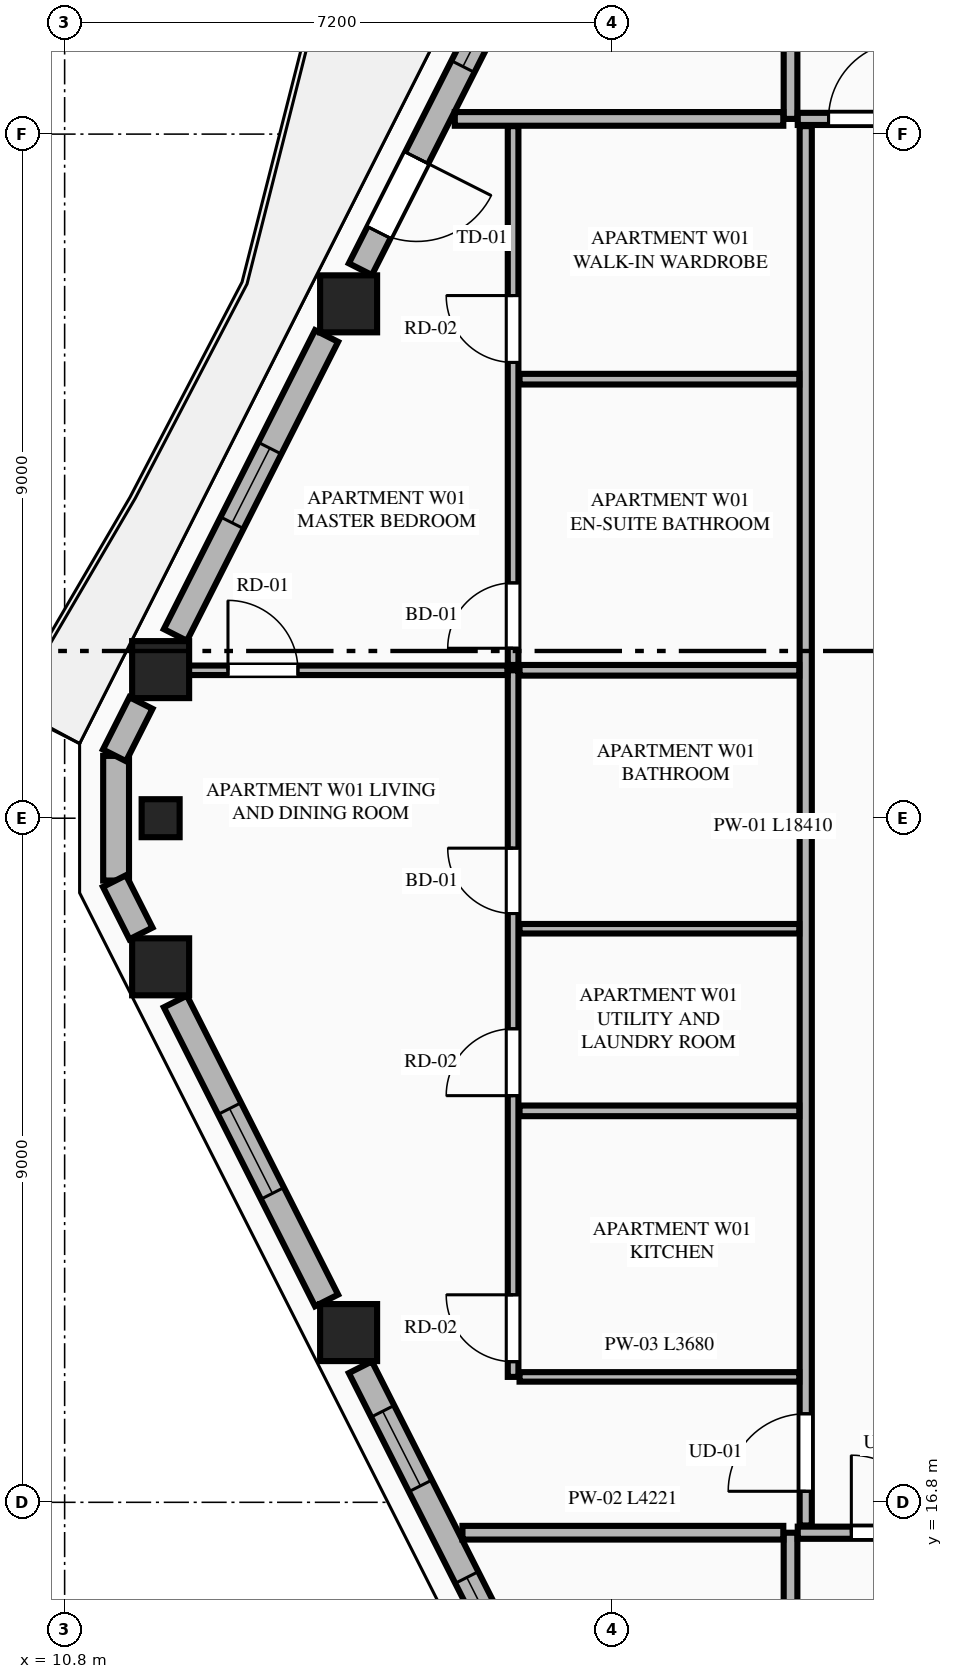
"""IFC4 building model, lengths in metres.
Left out: names, types, materials, properties, quantities, classifications, styles, units other than length and angle.
Written with IfcOpenShell. Run it as: python <this file> out.ifc"""

import sys

from ifc_helpers import new_model, si_unit, direction, frame, frame_2d, origin, origin_2d, place, context, subcontext, project, spatial, rectangle, extrude, element, fill, save


model = new_model("IFC4")
c1 = context("Model", 3, precision=1e-05, world=origin(), true_north=direction((0.0, 1.0)))
c2 = subcontext(c1, "Body", "Model", "MODEL_VIEW")
j1 = project(units=[si_unit("LENGTHUNIT", "METRE"), si_unit("PLANEANGLEUNIT", "RADIAN")], contexts=[c1])
p1 = place(None, origin())
s1 = spatial("IfcSite", under=j1, at=p1, CompositionType="ELEMENT")
p2 = place(p1, origin())
s2 = spatial("IfcBuilding", under=s1, at=p2, CompositionType="ELEMENT")
p3 = place(p2, frame((0.0, 0.0, 234.3)))
s3 = spatial("IfcBuildingStorey", under=s2, at=p3, CompositionType="ELEMENT", Elevation=234.3)
for number, where, z_axis, x_axis in (
    (1, (14.536, 32.567, 0.0), (0.0, 0.0, 1.0), (1.0, 0.0, 0.0)),
    (2, (12.063, 27.755, 0.0), (0.0, 0.0, 1.0), (1.0, 0.0, 0.0)),
    (3, (12.063, 23.845, 0.0), (0.0, 0.0, 1.0), (1.0, 0.0, 0.0)),
    (4, (14.536, 19.033, 0.0), (0.0, 0.0, 1.0), (1.0, 0.0, 0.0)),
):
    element("IfcColumn", number, at=place(p3, frame(where, z_axis=z_axis, x_axis=x_axis)), inside=s3, PredefinedType="COLUMN", context=c2, shape_type="SweptSolid", body=[
        extrude(rectangle(XDim=0.75, YDim=0.75, at=origin_2d()), origin(), (0.0, 0.0, 1.0), 3.65),
    ])
p4 = place(p3, frame((12.063, 25.8, 0.0), z_axis=(0.0, 0.0, 1.0), x_axis=(0.0, -1.0, 0.0)))
e5 = element("IfcColumn", 5, at=p4, inside=s3, PredefinedType="PILASTER", context=c2, shape_type="SweptSolid", body=[
    extrude(rectangle(XDim=0.5, YDim=0.35, at=origin_2d()), origin(), (0.0, 0.0, 1.0), 3.65),
])
p5 = place(p3, frame((11.477, 26.62, 0.0), z_axis=(0.0, 0.0, 1.0), x_axis=(0.0, -1.0, 0.0)))
e6 = element("IfcWall", 6, at=p5, inside=s3, PredefinedType="STANDARD", context=c2, shape_type="SweptSolid", body=[
    extrude(rectangle(XDim=1.64, YDim=0.34, at=frame_2d((0.82, 0.0))), origin(), (0.0, 0.0, 1.0), 3.45),
])
p6 = place(p3, frame((16.768, 37.127, 0.0), z_axis=(0.0, 0.0, 1.0), x_axis=(-0.451581819983, -0.892229712496, 0.0)))
e7 = element("IfcWall", 7, at=p6, inside=s3, PredefinedType="STANDARD", context=c2, shape_type="SweptSolid", body=[
    extrude(rectangle(XDim=4.6, YDim=0.34, at=frame_2d((2.3, 0.0))), origin(), (0.0, 0.0, 1.0), 2.983),
])
p7 = place(p6, frame((2.958, 0.0, 0.0)))
e8 = element("IfcOpeningElement", 8, at=p7, cuts=e7, PredefinedType="OPENING", context=c2, shape_type="SweptSolid", body=[
    extrude(rectangle(XDim=1.1, YDim=2.25, at=frame_2d((0.55, 1.125))), frame((0.0, 0.18, 0.0), z_axis=(0.0, -1.0, 0.0), x_axis=(1.0, 0.0, 0.0)), (0.0, 0.0, 1.0), 0.36),
])
p8 = place(p6, frame((0.512, 0.0, 0.75)))
e9 = element("IfcOpeningElement", 9, at=p8, cuts=e7, PredefinedType="OPENING", context=c2, shape_type="SweptSolid", body=[
    extrude(rectangle(XDim=1.1, YDim=2.0, at=frame_2d((0.55, 1.0))), frame((0.0, 0.18, 0.0), z_axis=(0.0, -1.0, 0.0), x_axis=(1.0, 0.0, 0.0)), (0.0, 0.0, 1.0), 0.36),
])
p9 = place(p3, frame((14.246, 32.144, 0.0), z_axis=(0.0, 0.0, 1.0), x_axis=(-0.451285866323, -0.892379441077, 0.0)))
e10 = element("IfcWall", 10, at=p9, inside=s3, PredefinedType="STANDARD", context=c2, shape_type="SweptSolid", body=[
    extrude(rectangle(XDim=4.407, YDim=0.34, at=frame_2d((2.204, 0.0))), origin(), (0.0, 0.0, 1.0), 2.983),
])
p10 = place(p9, frame((1.654, 0.0, 0.75)))
e11 = element("IfcOpeningElement", 11, at=p10, cuts=e10, PredefinedType="OPENING", context=c2, shape_type="SweptSolid", body=[
    extrude(rectangle(XDim=1.1, YDim=2.0, at=frame_2d((0.55, 1.0))), frame((0.0, 0.18, 0.0), z_axis=(0.0, -1.0, 0.0), x_axis=(1.0, 0.0, 0.0)), (0.0, 0.0, 1.0), 0.36),
])
for number, where, z_axis, x_axis in (
    (12, (11.804, 27.316, 0.0), (0.0, 0.0, 1.0), (-0.451, -0.893, 0.0)),
    (13, (11.456, 24.973, 0.0), (0.0, 0.0, 1.0), (0.451, -0.893, 0.0)),
):
    element("IfcWall", number, at=place(p3, frame(where, z_axis=z_axis, x_axis=x_axis)), inside=s3, PredefinedType="STANDARD", context=c2, shape_type="SweptSolid", body=[
        extrude(rectangle(XDim=0.772, YDim=0.34, at=frame_2d((0.386, 0.0))), origin(), (0.0, 0.0, 1.0), 3.45),
    ])
p11 = place(p3, frame((12.257, 23.389, 0.0), z_axis=(0.0, 0.0, 1.0), x_axis=(0.45130817501, -0.892368158984, 0.0)))
e14 = element("IfcWall", 14, at=p11, inside=s3, PredefinedType="STANDARD", context=c2, shape_type="SweptSolid", body=[
    extrude(rectangle(XDim=4.407, YDim=0.34, at=frame_2d((2.204, 0.0))), origin(), (0.0, 0.0, 1.0), 2.983),
])
p12 = place(p11, frame((1.579, 0.0, 0.75)))
e15 = element("IfcOpeningElement", 15, at=p12, cuts=e14, PredefinedType="OPENING", context=c2, shape_type="SweptSolid", body=[
    extrude(rectangle(XDim=1.25, YDim=1.95, at=frame_2d((0.625, 0.975))), frame((0.0, 0.18, 0.0), z_axis=(0.0, -1.0, 0.0), x_axis=(1.0, 0.0, 0.0)), (0.0, 0.0, 1.0), 0.36),
])
p13 = place(p3, frame((14.691, 18.577, 0.0), z_axis=(0.0, 0.0, 1.0), x_axis=(0.451581819983, -0.892229712496, 0.0)))
e16 = element("IfcWall", 16, at=p13, inside=s3, PredefinedType="STANDARD", context=c2, shape_type="SweptSolid", body=[
    extrude(rectangle(XDim=4.6, YDim=0.34, at=frame_2d((2.3, 0.0))), origin(), (0.0, 0.0, 1.0), 2.983),
])
p14 = place(p13, frame((0.649, 0.0, 0.75)))
e17 = element("IfcOpeningElement", 17, at=p14, cuts=e16, PredefinedType="OPENING", context=c2, shape_type="SweptSolid", body=[
    extrude(rectangle(XDim=1.1, YDim=2.0, at=frame_2d((0.55, 1.0))), frame((0.0, 0.18, 0.0), z_axis=(0.0, -1.0, 0.0), x_axis=(1.0, 0.0, 0.0)), (0.0, 0.0, 1.0), 0.36),
])
p15 = place(p13, frame((3.1, 0.0, 0.75)))
e18 = element("IfcOpeningElement", 18, at=p15, cuts=e16, PredefinedType="OPENING", context=c2, shape_type="SweptSolid", body=[
    extrude(rectangle(XDim=1.1, YDim=2.0, at=frame_2d((0.55, 1.0))), frame((0.0, 0.18, 0.0), z_axis=(0.0, -1.0, 0.0), x_axis=(1.0, 0.0, 0.0)), (0.0, 0.0, 1.0), 0.36),
])
p16 = place(p3, frame((20.35, 8.119, 0.0), z_axis=(0.0, 0.0, 1.0), x_axis=(0.0, 1.0, 0.0)))
e19 = element("IfcWall", 19, at=p16, inside=s3, PredefinedType="PARTITIONING", context=c2, shape_type="SweptSolid", body=[
    extrude(rectangle(XDim=8.281, YDim=0.18, at=frame_2d((4.141, 0.0))), origin(), (0.0, 0.0, 1.0), 3.45),
])
p17 = place(p3, frame((20.445, 16.4, 0.0), z_axis=(0.0, 0.0, 1.0), x_axis=(1.0, 0.0, 0.0)))
e20 = element("IfcWall", 20, at=p17, inside=s3, PredefinedType="PARTITIONING", context=c2, shape_type="SweptSolid", body=[
    extrude(rectangle(XDim=8.606, YDim=0.16, at=frame_2d((4.303, 0.0))), origin(), (0.0, 0.0, 1.0), 3.45),
])
p18 = place(p17, frame((0.705, 0.0, 0.0)))
e21 = element("IfcOpeningElement", 21, at=p18, cuts=e20, PredefinedType="OPENING", context=c2, shape_type="SweptSolid", body=[
    extrude(rectangle(XDim=1.02, YDim=2.25, at=frame_2d((0.51, 1.125))), frame((0.0, 0.09, 0.0), z_axis=(0.0, -1.0, 0.0), x_axis=(1.0, 0.0, 0.0)), (0.0, 0.0, 1.0), 0.18),
])
p19 = place(p3, frame((20.35, 35.0, 0.0), z_axis=(0.0, 0.0, 1.0), x_axis=(0.0, 1.0, 0.0)))
e22 = element("IfcWall", 22, at=p19, inside=s3, PredefinedType="PARTITIONING", context=c2, shape_type="SweptSolid", body=[
    extrude(rectangle(XDim=8.481, YDim=0.18, at=frame_2d((4.24, 0.0))), origin(), (0.0, 0.0, 1.0), 3.45),
])
p20 = place(p3, frame((20.445, 35.0, 0.0), z_axis=(0.0, 0.0, 1.0), x_axis=(1.0, 0.0, 0.0)))
e23 = element("IfcWall", 23, at=p20, inside=s3, PredefinedType="PARTITIONING", context=c2, shape_type="SweptSolid", body=[
    extrude(rectangle(XDim=8.606, YDim=0.16, at=frame_2d((4.303, 0.0))), origin(), (0.0, 0.0, 1.0), 3.45),
])
p21 = place(p20, frame((0.405, 0.0, 0.0)))
e24 = element("IfcOpeningElement", 24, at=p21, cuts=e23, PredefinedType="OPENING", context=c2, shape_type="SweptSolid", body=[
    extrude(rectangle(XDim=1.02, YDim=2.25, at=frame_2d((0.51, 1.125))), frame((0.0, 0.09, 0.0), z_axis=(0.0, -1.0, 0.0), x_axis=(1.0, 0.0, 0.0)), (0.0, 0.0, 1.0), 0.18),
])
p22 = place(p3, frame((16.034, 16.4, 0.0), z_axis=(0.0, 0.0, 1.0), x_axis=(1.0, 0.0, 0.0)))
e25 = element("IfcWall", 25, at=p22, inside=s3, PredefinedType="PARTITIONING", context=c2, shape_type="SweptSolid", body=[
    extrude(rectangle(XDim=4.221, YDim=0.18, at=frame_2d((2.11, 0.0))), origin(), (0.0, 0.0, 1.0), 3.45),
])
p23 = place(p3, frame((15.933, 35.0, 0.0), z_axis=(0.0, 0.0, 1.0), x_axis=(1.0, 0.0, 0.0)))
e26 = element("IfcWall", 26, at=p23, inside=s3, PredefinedType="PARTITIONING", context=c2, shape_type="SweptSolid", body=[
    extrude(rectangle(XDim=4.322, YDim=0.18, at=frame_2d((2.161, 0.0))), origin(), (0.0, 0.0, 1.0), 3.45),
])
p24 = place(p3, frame((20.55, 16.495, 0.0), z_axis=(0.0, 0.0, 1.0), x_axis=(0.0, 1.0, 0.0)))
e27 = element("IfcWall", 27, at=p24, inside=s3, PredefinedType="PARTITIONING", context=c2, shape_type="SweptSolid", body=[
    extrude(rectangle(XDim=18.41, YDim=0.16, at=frame_2d((9.205, 0.0))), origin(), (0.0, 0.0, 1.0), 3.137),
])
p25 = place(p24, frame((0.45, 0.0, 0.0)))
e28 = element("IfcOpeningElement", 28, at=p25, cuts=e27, PredefinedType="OPENING", context=c2, shape_type="SweptSolid", body=[
    extrude(rectangle(XDim=1.02, YDim=2.25, at=frame_2d((0.51, 1.125))), frame((0.0, 0.09, 0.0), z_axis=(0.0, -1.0, 0.0), x_axis=(1.0, 0.0, 0.0)), (0.0, 0.0, 1.0), 0.18),
])
p26 = place(p3, frame((16.785, 18.45, 0.0), z_axis=(0.0, 0.0, 1.0), x_axis=(1.0, 0.0, 0.0)))
e29 = element("IfcWall", 29, at=p26, inside=s3, PredefinedType="PARTITIONING", context=c2, shape_type="SweptSolid", body=[
    extrude(rectangle(XDim=3.68, YDim=0.125, at=frame_2d((1.84, 0.0))), origin(), (0.0, 0.0, 1.0), 3.45),
])
p27 = place(p3, frame((16.7, 18.45, 0.0), z_axis=(0.0, 0.0, 1.0), x_axis=(0.0, 1.0, 0.0)))
e30 = element("IfcWall", 30, at=p27, inside=s3, PredefinedType="PLUMBINGWALL", context=c2, shape_type="SweptSolid", body=[
    extrude(rectangle(XDim=9.296, YDim=0.14, at=frame_2d((4.648, 0.0))), origin(), (0.0, 0.0, 1.0), 3.45),
])
p28 = place(p27, frame((0.2, 0.0, 0.0)))
e31 = element("IfcOpeningElement", 31, at=p28, cuts=e30, PredefinedType="OPENING", context=c2, shape_type="SweptSolid", body=[
    extrude(rectangle(XDim=0.88, YDim=2.15, at=frame_2d((0.44, 1.075))), frame((0.0, 0.08, 0.0), z_axis=(0.0, -1.0, 0.0), x_axis=(1.0, 0.0, 0.0)), (0.0, 0.0, 1.0), 0.16),
])
p29 = place(p27, frame((3.7, 0.0, 0.0)))
e32 = element("IfcOpeningElement", 32, at=p29, cuts=e30, PredefinedType="OPENING", context=c2, shape_type="SweptSolid", body=[
    extrude(rectangle(XDim=0.88, YDim=2.15, at=frame_2d((0.44, 1.075))), frame((0.0, 0.08, 0.0), z_axis=(0.0, -1.0, 0.0), x_axis=(1.0, 0.0, 0.0)), (0.0, 0.0, 1.0), 0.16),
])
p30 = place(p27, frame((6.096, 0.0, 0.0)))
e33 = element("IfcOpeningElement", 33, at=p30, cuts=e30, PredefinedType="OPENING", context=c2, shape_type="SweptSolid", body=[
    extrude(rectangle(XDim=0.86, YDim=2.1, at=frame_2d((0.43, 1.05))), frame((0.0, 0.08, 0.0), z_axis=(0.0, -1.0, 0.0), x_axis=(1.0, 0.0, 0.0)), (0.0, 0.0, 1.0), 0.16),
])
p31 = place(p3, frame((16.7, 27.816, 0.0), z_axis=(0.0, 0.0, 1.0), x_axis=(0.0, 1.0, 0.0)))
e34 = element("IfcWall", 34, at=p31, inside=s3, PredefinedType="PLUMBINGWALL", context=c2, shape_type="SweptSolid", body=[
    extrude(rectangle(XDim=7.089, YDim=0.14, at=frame_2d((3.544, 0.0))), origin(), (0.0, 0.0, 1.0), 3.45),
])
p32 = place(p31, frame((0.22, 0.0, 0.0)))
e35 = element("IfcOpeningElement", 35, at=p32, cuts=e34, PredefinedType="OPENING", context=c2, shape_type="SweptSolid", body=[
    extrude(rectangle(XDim=0.86, YDim=2.1, at=frame_2d((0.43, 1.05))), frame((0.0, 0.08, 0.0), z_axis=(0.0, -1.0, 0.0), x_axis=(1.0, 0.0, 0.0)), (0.0, 0.0, 1.0), 0.16),
])
p33 = place(p31, frame((3.98, 0.0, 0.0)))
e36 = element("IfcOpeningElement", 36, at=p33, cuts=e34, PredefinedType="OPENING", context=c2, shape_type="SweptSolid", body=[
    extrude(rectangle(XDim=0.88, YDim=2.15, at=frame_2d((0.44, 1.075))), frame((0.0, 0.08, 0.0), z_axis=(0.0, -1.0, 0.0), x_axis=(1.0, 0.0, 0.0)), (0.0, 0.0, 1.0), 0.16),
])
p34 = place(p3, frame((16.785, 27.746, 0.0), z_axis=(0.0, 0.0, 1.0), x_axis=(1.0, 0.0, 0.0)))
e37 = element("IfcWall", 37, at=p34, inside=s3, PredefinedType="PLUMBINGWALL", context=c2, shape_type="SweptSolid", body=[
    extrude(rectangle(XDim=3.68, YDim=0.14, at=frame_2d((1.84, 0.0))), origin(), (0.0, 0.0, 1.0), 2.907),
])
p35 = place(p3, frame((12.249, 27.746, 0.0), z_axis=(0.0, 0.0, 1.0), x_axis=(1.0, 0.0, 0.0)))
e38 = element("IfcWall", 38, at=p35, inside=s3, PredefinedType="PARTITIONING", context=c2, shape_type="SweptSolid", body=[
    extrude(rectangle(XDim=4.376, YDim=0.125, at=frame_2d((2.188, 0.0))), origin(), (0.0, 0.0, 1.0), 2.907),
])
p36 = place(p35, frame((0.7, 0.0, 0.0)))
e39 = element("IfcOpeningElement", 39, at=p36, cuts=e38, PredefinedType="OPENING", context=c2, shape_type="SweptSolid", body=[
    extrude(rectangle(XDim=0.92, YDim=2.15, at=frame_2d((0.46, 1.075))), frame((0.0, 0.073, 0.0), z_axis=(0.0, -1.0, 0.0), x_axis=(1.0, 0.0, 0.0)), (0.0, 0.0, 1.0), 0.145),
])
p37 = place(p3, frame((16.785, 21.95, 0.0), z_axis=(0.0, 0.0, 1.0), x_axis=(1.0, 0.0, 0.0)))
e40 = element("IfcWall", 40, at=p37, inside=s3, PredefinedType="PLUMBINGWALL", context=c2, shape_type="SweptSolid", body=[
    extrude(rectangle(XDim=3.68, YDim=0.14, at=frame_2d((1.84, 0.0))), origin(), (0.0, 0.0, 1.0), 3.45),
])
p38 = place(p3, frame((16.785, 24.346, 0.0), z_axis=(0.0, 0.0, 1.0), x_axis=(1.0, 0.0, 0.0)))
e41 = element("IfcWall", 41, at=p38, inside=s3, PredefinedType="PARTITIONING", context=c2, shape_type="SweptSolid", body=[
    extrude(rectangle(XDim=3.68, YDim=0.125, at=frame_2d((1.84, 0.0))), origin(), (0.0, 0.0, 1.0), 3.45),
])
p39 = place(p3, frame((16.785, 31.576, 0.0), z_axis=(0.0, 0.0, 1.0), x_axis=(1.0, 0.0, 0.0)))
e42 = element("IfcWall", 42, at=p39, inside=s3, PredefinedType="PLUMBINGWALL", context=c2, shape_type="SweptSolid", body=[
    extrude(rectangle(XDim=3.68, YDim=0.14, at=frame_2d((1.84, 0.0))), origin(), (0.0, 0.0, 1.0), 3.45),
])
p40 = place(p7, origin())
e43 = element("IfcDoor", 43, at=p40, inside=s3, OperationType="SINGLE_SWING_LEFT", PredefinedType="DOOR", context=c2, shape_type="SweptSolid", body=[
    extrude(rectangle(XDim=1.1, YDim=2.25, at=frame_2d((0.55, 1.125))), frame((0.0, 0.025, 0.0), z_axis=(0.0, -1.0, 0.0), x_axis=(1.0, 0.0, 0.0)), (0.0, 0.0, 1.0), 0.05),
])
fill(e8, e43)
p41 = place(p10, origin())
e44 = element("IfcWindow", 44, at=p41, inside=s3, PartitioningType="SINGLE_PANEL", PredefinedType="WINDOW", context=c2, shape_type="SweptSolid", body=[
    extrude(rectangle(XDim=1.1, YDim=2.0, at=frame_2d((0.55, 1.0))), frame((0.0, 0.03, 0.0), z_axis=(0.0, -1.0, 0.0), x_axis=(1.0, 0.0, 0.0)), (0.0, 0.0, 1.0), 0.06),
])
fill(e11, e44)
p42 = place(p12, origin())
e45 = element("IfcWindow", 45, at=p42, inside=s3, PartitioningType="SINGLE_PANEL", PredefinedType="WINDOW", context=c2, shape_type="SweptSolid", body=[
    extrude(rectangle(XDim=1.25, YDim=1.95, at=frame_2d((0.625, 0.975))), frame((0.0, 0.03, 0.0), z_axis=(0.0, -1.0, 0.0), x_axis=(1.0, 0.0, 0.0)), (0.0, 0.0, 1.0), 0.06),
])
fill(e15, e45)
p43 = place(p14, origin())
e46 = element("IfcWindow", 46, at=p43, inside=s3, PartitioningType="SINGLE_PANEL", PredefinedType="WINDOW", context=c2, shape_type="SweptSolid", body=[
    extrude(rectangle(XDim=1.1, YDim=2.0, at=frame_2d((0.55, 1.0))), frame((0.0, 0.03, 0.0), z_axis=(0.0, -1.0, 0.0), x_axis=(1.0, 0.0, 0.0)), (0.0, 0.0, 1.0), 0.06),
])
fill(e17, e46)
p44 = place(p18, origin())
e47 = element("IfcDoor", 47, at=p44, inside=s3, OperationType="SINGLE_SWING_LEFT", PredefinedType="DOOR", context=c2, shape_type="SweptSolid", body=[
    extrude(rectangle(XDim=1.02, YDim=2.25, at=frame_2d((0.51, 1.125))), frame((0.0, 0.025, 0.0), z_axis=(0.0, -1.0, 0.0), x_axis=(1.0, 0.0, 0.0)), (0.0, 0.0, 1.0), 0.05),
])
fill(e21, e47)
p45 = place(p21, origin())
e48 = element("IfcDoor", 48, at=p45, inside=s3, OperationType="SINGLE_SWING_RIGHT", PredefinedType="DOOR", context=c2, shape_type="SweptSolid", body=[
    extrude(rectangle(XDim=1.02, YDim=2.25, at=frame_2d((0.51, 1.125))), frame((0.0, 0.025, 0.0), z_axis=(0.0, -1.0, 0.0), x_axis=(1.0, 0.0, 0.0)), (0.0, 0.0, 1.0), 0.05),
])
fill(e24, e48)
p46 = place(p28, origin())
e49 = element("IfcDoor", 49, at=p46, inside=s3, OperationType="SINGLE_SWING_RIGHT", PredefinedType="DOOR", context=c2, shape_type="SweptSolid", body=[
    extrude(rectangle(XDim=0.88, YDim=2.15, at=frame_2d((0.44, 1.075))), frame((0.0, 0.025, 0.0), z_axis=(0.0, -1.0, 0.0), x_axis=(1.0, 0.0, 0.0)), (0.0, 0.0, 1.0), 0.05),
])
fill(e31, e49)
p47 = place(p29, origin())
e50 = element("IfcDoor", 50, at=p47, inside=s3, OperationType="SINGLE_SWING_LEFT", PredefinedType="DOOR", context=c2, shape_type="SweptSolid", body=[
    extrude(rectangle(XDim=0.88, YDim=2.15, at=frame_2d((0.44, 1.075))), frame((0.0, 0.025, 0.0), z_axis=(0.0, -1.0, 0.0), x_axis=(1.0, 0.0, 0.0)), (0.0, 0.0, 1.0), 0.05),
])
fill(e32, e50)
p48 = place(p30, origin())
e51 = element("IfcDoor", 51, at=p48, inside=s3, OperationType="SINGLE_SWING_RIGHT", PredefinedType="DOOR", context=c2, shape_type="SweptSolid", body=[
    extrude(rectangle(XDim=0.86, YDim=2.1, at=frame_2d((0.43, 1.05))), frame((0.0, 0.025, 0.0), z_axis=(0.0, -1.0, 0.0), x_axis=(1.0, 0.0, 0.0)), (0.0, 0.0, 1.0), 0.05),
])
fill(e33, e51)
p49 = place(p32, origin())
e52 = element("IfcDoor", 52, at=p49, inside=s3, OperationType="SINGLE_SWING_LEFT", PredefinedType="DOOR", context=c2, shape_type="SweptSolid", body=[
    extrude(rectangle(XDim=0.86, YDim=2.1, at=frame_2d((0.43, 1.05))), frame((0.0, 0.025, 0.0), z_axis=(0.0, -1.0, 0.0), x_axis=(1.0, 0.0, 0.0)), (0.0, 0.0, 1.0), 0.05),
])
fill(e35, e52)
p50 = place(p33, origin())
e53 = element("IfcDoor", 53, at=p50, inside=s3, OperationType="SINGLE_SWING_RIGHT", PredefinedType="DOOR", context=c2, shape_type="SweptSolid", body=[
    extrude(rectangle(XDim=0.88, YDim=2.15, at=frame_2d((0.44, 1.075))), frame((0.0, 0.025, 0.0), z_axis=(0.0, -1.0, 0.0), x_axis=(1.0, 0.0, 0.0)), (0.0, 0.0, 1.0), 0.05),
])
fill(e36, e53)
p51 = place(p25, origin())
e54 = element("IfcDoor", 54, at=p51, inside=s3, OperationType="SINGLE_SWING_LEFT", PredefinedType="DOOR", context=c2, shape_type="SweptSolid", body=[
    extrude(rectangle(XDim=1.02, YDim=2.25, at=frame_2d((0.51, 1.125))), frame((0.0, 0.025, 0.0), z_axis=(0.0, -1.0, 0.0), x_axis=(1.0, 0.0, 0.0)), (0.0, 0.0, 1.0), 0.05),
])
fill(e28, e54)
p52 = place(p36, origin())
e55 = element("IfcDoor", 55, at=p52, inside=s3, OperationType="SINGLE_SWING_LEFT", PredefinedType="DOOR", context=c2, shape_type="SweptSolid", body=[
    extrude(rectangle(XDim=0.92, YDim=2.15, at=frame_2d((0.46, 1.075))), frame((0.0, 0.025, 0.0), z_axis=(0.0, -1.0, 0.0), x_axis=(1.0, 0.0, 0.0)), (0.0, 0.0, 1.0), 0.05),
])
fill(e39, e55)
p53 = place(p8, origin())
e56 = element("IfcWindow", 56, at=p53, inside=s3, PartitioningType="SINGLE_PANEL", PredefinedType="WINDOW", context=c2, shape_type="SweptSolid", body=[
    extrude(rectangle(XDim=1.1, YDim=2.0, at=frame_2d((0.55, 1.0))), frame((0.0, 0.03, 0.0), z_axis=(0.0, -1.0, 0.0), x_axis=(1.0, 0.0, 0.0)), (0.0, 0.0, 1.0), 0.06),
])
fill(e9, e56)
p54 = place(p15, origin())
e57 = element("IfcWindow", 57, at=p54, inside=s3, PartitioningType="SINGLE_PANEL", PredefinedType="WINDOW", context=c2, shape_type="SweptSolid", body=[
    extrude(rectangle(XDim=1.1, YDim=2.0, at=frame_2d((0.55, 1.0))), frame((0.0, 0.03, 0.0), z_axis=(0.0, -1.0, 0.0), x_axis=(1.0, 0.0, 0.0)), (0.0, 0.0, 1.0), 0.06),
])
fill(e18, e57)
save(model, sys.argv[1])
